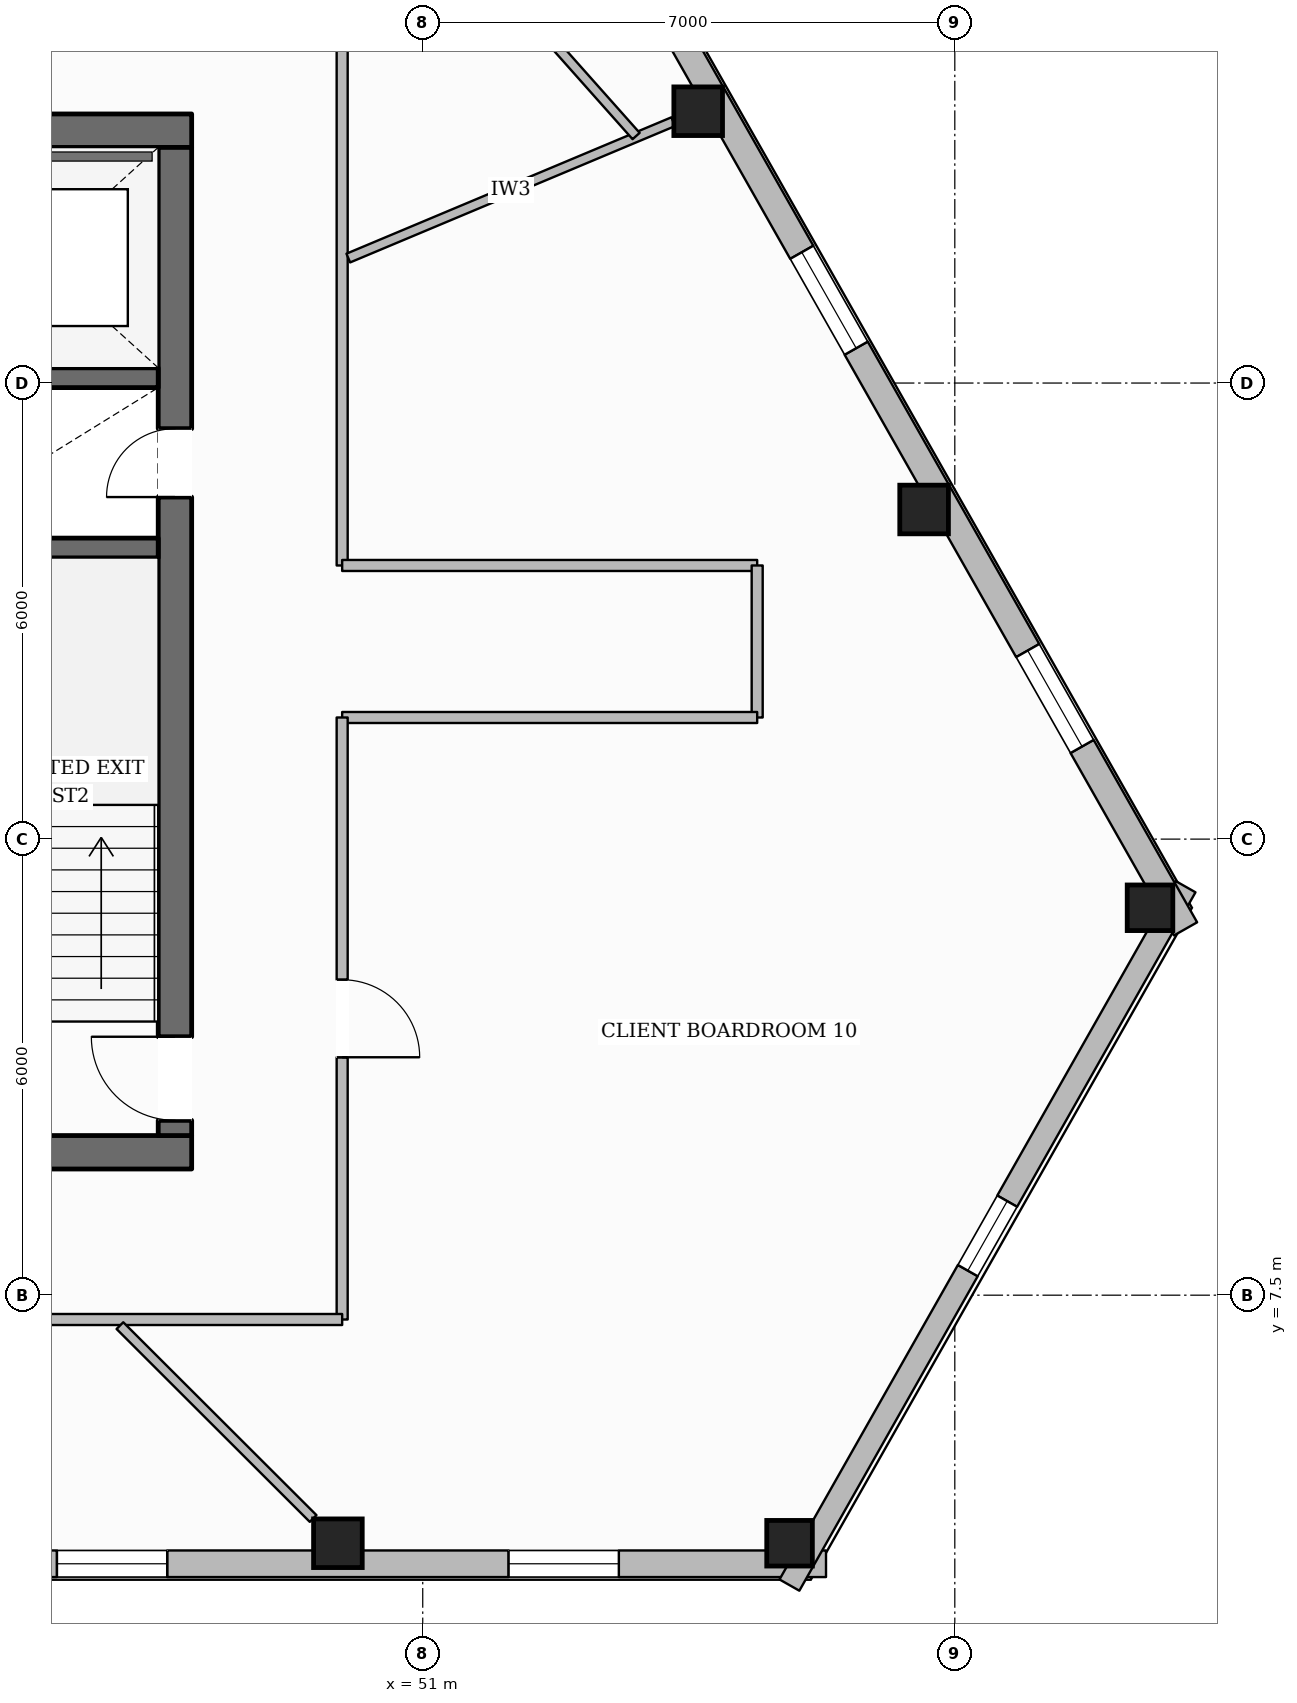
"""IFC4 building model, lengths in metres.
Left out: names, types, materials, properties, quantities, classifications, styles, units other than length and angle.
Written with IfcOpenShell. Run it as: python <this file> out.ifc"""

import sys

from ifc_helpers import new_model, si_unit, direction, frame, frame_2d, origin, origin_2d, place, context, subcontext, project, spatial, rectangle, hollow_rectangle, extrude, element, fill, save


model = new_model("IFC4")
c1 = context("Model", 3, precision=1e-05, world=origin(), true_north=direction((0.0, 1.0)))
c2 = subcontext(c1, "Body", "Model", "MODEL_VIEW")
j1 = project(units=[si_unit("LENGTHUNIT", "METRE"), si_unit("PLANEANGLEUNIT", "RADIAN")], contexts=[c1])
p1 = place(None, origin())
s1 = spatial("IfcSite", under=j1, at=p1, CompositionType="ELEMENT")
p2 = place(p1, origin())
s2 = spatial("IfcBuilding", under=s1, at=p2, CompositionType="ELEMENT")
p3 = place(p2, frame((0.0, 0.0, 165.0)))
s3 = spatial("IfcBuildingStorey", under=s2, at=p3, CompositionType="ELEMENT", Elevation=165.0)
p4 = place(p3, frame((28.04, 9.38, 0.0), z_axis=(0.0, 0.0, 1.0), x_axis=(1.0, 0.0, 0.0)))
e1 = element("IfcWall", 1, at=p4, inside=s3, PredefinedType="SOLIDWALL", context=c2, shape_type="SweptSolid", body=[
    extrude(rectangle(XDim=19.92, YDim=0.44, at=frame_2d((9.96, 0.0))), origin(), (0.0, 0.0, 1.0), 3.6),
])
p5 = place(p4, frame((10.46, 0.0, 0.0)))
e2 = element("IfcOpeningElement", 2, at=p5, cuts=e1, PredefinedType="OPENING", context=c2, shape_type="SweptSolid", body=[
    extrude(rectangle(XDim=1.4, YDim=2.2, at=frame_2d((0.7, 1.1))), frame((0.0, 0.23, 0.0), z_axis=(0.0, -1.0, 0.0), x_axis=(1.0, 0.0, 0.0)), (0.0, 0.0, 1.0), 0.46),
])
p6 = place(p3, frame((28.04, 22.82, 0.0), z_axis=(0.0, 0.0, 1.0), x_axis=(1.0, 0.0, 0.0)))
e3 = element("IfcWall", 3, at=p6, inside=s3, PredefinedType="SOLIDWALL", context=c2, shape_type="SweptSolid", body=[
    extrude(rectangle(XDim=19.92, YDim=0.44, at=frame_2d((9.96, 0.0))), origin(), (0.0, 0.0, 1.0), 3.6),
])
p7 = place(p6, frame((6.235, 0.0, 0.0)))
e4 = element("IfcOpeningElement", 4, at=p7, cuts=e3, PredefinedType="OPENING", context=c2, shape_type="SweptSolid", body=[
    extrude(rectangle(XDim=1.05, YDim=2.15, at=frame_2d((0.525, 1.075))), frame((0.0, 0.23, 0.0), z_axis=(0.0, -1.0, 0.0), x_axis=(1.0, 0.0, 0.0)), (0.0, 0.0, 1.0), 0.46),
])
p8 = place(p6, frame((12.635, 0.0, 0.0)))
e5 = element("IfcOpeningElement", 5, at=p8, cuts=e3, PredefinedType="OPENING", context=c2, shape_type="SweptSolid", body=[
    extrude(rectangle(XDim=1.05, YDim=2.15, at=frame_2d((0.525, 1.075))), frame((0.0, 0.23, 0.0), z_axis=(0.0, -1.0, 0.0), x_axis=(1.0, 0.0, 0.0)), (0.0, 0.0, 1.0), 0.46),
])
p9 = place(p3, frame((47.74, 9.6, 0.0), z_axis=(0.0, 0.0, 1.0), x_axis=(0.0, 1.0, 0.0)))
e6 = element("IfcWall", 6, at=p9, inside=s3, PredefinedType="SOLIDWALL", context=c2, shape_type="SweptSolid", body=[
    extrude(rectangle(XDim=13.0, YDim=0.44, at=frame_2d((6.5, 0.0))), origin(), (0.0, 0.0, 1.0), 3.6),
])
p10 = place(p9, frame((0.2, 0.0, 0.0)))
e7 = element("IfcOpeningElement", 7, at=p10, cuts=e6, PredefinedType="OPENING", context=c2, shape_type="SweptSolid", body=[
    extrude(rectangle(XDim=1.1, YDim=2.15, at=frame_2d((0.55, 1.075))), frame((0.0, 0.23, 0.0), z_axis=(0.0, -1.0, 0.0), x_axis=(1.0, 0.0, 0.0)), (0.0, 0.0, 1.0), 0.46),
])
p11 = place(p9, frame((8.4, 0.0, 0.0)))
e8 = element("IfcOpeningElement", 8, at=p11, cuts=e6, PredefinedType="OPENING", context=c2, shape_type="SweptSolid", body=[
    extrude(rectangle(XDim=0.9, YDim=2.1, at=frame_2d((0.45, 1.05))), frame((0.0, 0.23, 0.0), z_axis=(0.0, -1.0, 0.0), x_axis=(1.0, 0.0, 0.0)), (0.0, 0.0, 1.0), 0.46),
])
for number, where, z_axis, x_axis in (
    (9, (44.32, 17.33, 0.0), (0.0, 0.0, 1.0), (1.0, 0.0, 0.0)),
    (10, (44.32, 19.57, 0.0), (0.0, 0.0, 1.0), (1.0, 0.0, 0.0)),
):
    element("IfcWall", number, at=place(p3, frame(where, z_axis=z_axis, x_axis=x_axis)), inside=s3, PredefinedType="SHEAR", context=c2, shape_type="SweptSolid", body=[
        extrude(rectangle(XDim=3.2, YDim=0.26, at=frame_2d((1.6, 0.0))), origin(), (0.0, 0.0, 1.0), 3.6),
    ])
p12 = place(p3, frame((49.884, 4.237, 0.0), z_axis=(0.0, 0.0, 1.0), x_axis=(1.0, 0.0, 0.0)))
e11 = element("IfcColumn", 11, at=p12, inside=s3, PredefinedType="COLUMN", context=c2, shape_type="SweptSolid", body=[
    extrude(hollow_rectangle(XDim=0.64, YDim=0.64, WallThickness=0.028, at=origin_2d()), origin(), (0.0, 0.0, 1.0), 3.6),
])
for number, where, z_axis, x_axis in (
    (12, (55.826, 4.237, 0.0), (0.0, 0.0, 1.0), (1.0, 0.0, 0.0)),
    (13, (60.568, 12.597, 0.0), (0.0, 0.0, 1.0), (1.0, 0.0, 0.0)),
):
    element("IfcColumn", number, at=place(p3, frame(where, z_axis=z_axis, x_axis=x_axis)), inside=s3, PredefinedType="COLUMN", context=c2, shape_type="SweptSolid", body=[
        extrude(hollow_rectangle(XDim=0.6, YDim=0.6, WallThickness=0.028, at=origin_2d()), origin(), (0.0, 0.0, 1.0), 3.6),
    ])
for number, where, z_axis, x_axis in (
    (14, (57.596, 17.836, 0.0), (0.0, 0.0, 1.0), (1.0, 0.0, 0.0)),
    (15, (54.624, 23.076, 0.0), (0.0, 0.0, 1.0), (1.0, 0.0, 0.0)),
):
    element("IfcColumn", number, at=place(p3, frame(where, z_axis=z_axis, x_axis=x_axis)), inside=s3, PredefinedType="COLUMN", context=c2, shape_type="SweptSolid", body=[
        extrude(hollow_rectangle(XDim=0.64, YDim=0.64, WallThickness=0.028, at=origin_2d()), origin(), (0.0, 0.0, 1.0), 3.6),
    ])
p13 = place(p3, frame((56.305, 3.967, 0.0), z_axis=(0.0, 0.0, 1.0), x_axis=(-1.0, 0.0, 0.0)))
e16 = element("IfcWall", 16, at=p13, inside=s3, PredefinedType="STANDARD", context=c2, shape_type="SweptSolid", body=[
    extrude(rectangle(XDim=36.611, YDim=0.35, at=frame_2d((18.305, 0.0))), origin(), (0.0, 0.0, 1.0), 3.132),
])
p14 = place(p13, frame((32.435, 0.0, 0.65)))
e17 = element("IfcOpeningElement", 17, at=p14, cuts=e16, PredefinedType="OPENING", context=c2, shape_type="SweptSolid", body=[
    extrude(rectangle(XDim=1.45, YDim=1.75, at=frame_2d((0.725, 0.875))), frame((0.0, 0.185, 0.0), z_axis=(0.0, -1.0, 0.0), x_axis=(1.0, 0.0, 0.0)), (0.0, 0.0, 1.0), 0.37),
])
p15 = place(p13, frame((26.493, 0.0, 0.65)))
e18 = element("IfcOpeningElement", 18, at=p15, cuts=e16, PredefinedType="OPENING", context=c2, shape_type="SweptSolid", body=[
    extrude(rectangle(XDim=1.45, YDim=1.75, at=frame_2d((0.725, 0.875))), frame((0.0, 0.185, 0.0), z_axis=(0.0, -1.0, 0.0), x_axis=(1.0, 0.0, 0.0)), (0.0, 0.0, 1.0), 0.37),
])
p16 = place(p13, frame((14.61, 0.0, 0.65)))
e19 = element("IfcOpeningElement", 19, at=p16, cuts=e16, PredefinedType="OPENING", context=c2, shape_type="SweptSolid", body=[
    extrude(rectangle(XDim=1.45, YDim=1.75, at=frame_2d((0.725, 0.875))), frame((0.0, 0.185, 0.0), z_axis=(0.0, -1.0, 0.0), x_axis=(1.0, 0.0, 0.0)), (0.0, 0.0, 1.0), 0.37),
])
p17 = place(p13, frame((8.667, 0.0, 0.65)))
e20 = element("IfcOpeningElement", 20, at=p17, cuts=e16, PredefinedType="OPENING", context=c2, shape_type="SweptSolid", body=[
    extrude(rectangle(XDim=1.45, YDim=1.75, at=frame_2d((0.725, 0.875))), frame((0.0, 0.185, 0.0), z_axis=(0.0, -1.0, 0.0), x_axis=(1.0, 0.0, 0.0)), (0.0, 0.0, 1.0), 0.37),
])
p18 = place(p13, frame((2.726, 0.0, 0.65)))
e21 = element("IfcOpeningElement", 21, at=p18, cuts=e16, PredefinedType="OPENING", context=c2, shape_type="SweptSolid", body=[
    extrude(rectangle(XDim=1.45, YDim=1.75, at=frame_2d((0.725, 0.875))), frame((0.0, 0.185, 0.0), z_axis=(0.0, -1.0, 0.0), x_axis=(1.0, 0.0, 0.0)), (0.0, 0.0, 1.0), 0.37),
])
p19 = place(p3, frame((61.036, 12.874, 0.0), z_axis=(0.0, 0.0, 1.0), x_axis=(-0.493371164069, -0.869818886013, 0.0)))
e22 = element("IfcWall", 22, at=p19, inside=s3, PredefinedType="STANDARD", context=c2, shape_type="SweptSolid", body=[
    extrude(rectangle(XDim=10.563, YDim=0.3, at=frame_2d((5.282, 0.0))), origin(), (0.0, 0.0, 1.0), 3.132),
])
p20 = place(p19, frame((4.757, 0.0, 0.65)))
e23 = element("IfcOpeningElement", 23, at=p20, cuts=e22, PredefinedType="OPENING", context=c2, shape_type="SweptSolid", body=[
    extrude(rectangle(XDim=1.05, YDim=1.7, at=frame_2d((0.525, 0.85))), frame((0.0, 0.16, 0.0), z_axis=(0.0, -1.0, 0.0), x_axis=(1.0, 0.0, 0.0)), (0.0, 0.0, 1.0), 0.32),
])
p21 = place(p3, frame((42.733, 44.585, 0.0), z_axis=(0.0, 0.0, 1.0), x_axis=(0.493387150796, -0.869809817966, 0.0)))
e24 = element("IfcWall", 24, at=p21, inside=s3, PredefinedType="STANDARD", context=c2, shape_type="SweptSolid", body=[
    extrude(rectangle(XDim=37.096, YDim=0.35, at=frame_2d((18.548, 0.0))), origin(), (0.0, 0.0, 1.0), 3.132),
])
p22 = place(p21, frame((32.886, 0.0, 0.65)))
e25 = element("IfcOpeningElement", 25, at=p22, cuts=e24, PredefinedType="OPENING", context=c2, shape_type="SweptSolid", body=[
    extrude(rectangle(XDim=1.45, YDim=1.75, at=frame_2d((0.725, 0.875))), frame((0.0, 0.185, 0.0), z_axis=(0.0, -1.0, 0.0), x_axis=(1.0, 0.0, 0.0)), (0.0, 0.0, 1.0), 0.37),
])
p23 = place(p21, frame((26.863, 0.0, 0.65)))
e26 = element("IfcOpeningElement", 26, at=p23, cuts=e24, PredefinedType="OPENING", context=c2, shape_type="SweptSolid", body=[
    extrude(rectangle(XDim=1.45, YDim=1.75, at=frame_2d((0.725, 0.875))), frame((0.0, 0.185, 0.0), z_axis=(0.0, -1.0, 0.0), x_axis=(1.0, 0.0, 0.0)), (0.0, 0.0, 1.0), 0.37),
])
p24 = place(p21, frame((14.814, 0.0, 0.65)))
e27 = element("IfcOpeningElement", 27, at=p24, cuts=e24, PredefinedType="OPENING", context=c2, shape_type="SweptSolid", body=[
    extrude(rectangle(XDim=1.45, YDim=1.75, at=frame_2d((0.725, 0.875))), frame((0.0, 0.185, 0.0), z_axis=(0.0, -1.0, 0.0), x_axis=(1.0, 0.0, 0.0)), (0.0, 0.0, 1.0), 0.37),
])
p25 = place(p21, frame((8.791, 0.0, 0.65)))
e28 = element("IfcOpeningElement", 28, at=p25, cuts=e24, PredefinedType="OPENING", context=c2, shape_type="SweptSolid", body=[
    extrude(rectangle(XDim=1.45, YDim=1.75, at=frame_2d((0.725, 0.875))), frame((0.0, 0.185, 0.0), z_axis=(0.0, -1.0, 0.0), x_axis=(1.0, 0.0, 0.0)), (0.0, 0.0, 1.0), 0.37),
])
p26 = place(p21, frame((2.767, 0.0, 0.65)))
e29 = element("IfcOpeningElement", 29, at=p26, cuts=e24, PredefinedType="OPENING", context=c2, shape_type="SweptSolid", body=[
    extrude(rectangle(XDim=1.45, YDim=1.75, at=frame_2d((0.725, 0.875))), frame((0.0, 0.185, 0.0), z_axis=(0.0, -1.0, 0.0), x_axis=(1.0, 0.0, 0.0)), (0.0, 0.0, 1.0), 0.37),
])
p27 = place(p3, frame((49.94, 25.02, 0.0), z_axis=(0.0, 0.0, 1.0), x_axis=(0.0, -1.0, 0.0)))
e30 = element("IfcWall", 30, at=p27, inside=s3, PredefinedType="PARTITIONING", context=c2, shape_type="SweptSolid", body=[
    extrude(rectangle(XDim=7.92, YDim=0.145, at=frame_2d((3.96, 0.0))), origin(), (0.0, 0.0, 1.0), 3.339),
])
p28 = place(p3, frame((49.94, 17.1, 0.0), z_axis=(0.0, 0.0, 1.0), x_axis=(1.0, 0.0, 0.0)))
e31 = element("IfcWall", 31, at=p28, inside=s3, PredefinedType="PARTITIONING", context=c2, shape_type="SweptSolid", body=[
    extrude(rectangle(XDim=5.46, YDim=0.145, at=frame_2d((2.73, 0.0))), origin(), (0.0, 0.0, 1.0), 3.6),
])
p29 = place(p3, frame((55.4, 17.1, 0.0), z_axis=(0.0, 0.0, 1.0), x_axis=(0.0, -1.0, 0.0)))
e32 = element("IfcWall", 32, at=p29, inside=s3, PredefinedType="PARTITIONING", context=c2, shape_type="SweptSolid", body=[
    extrude(rectangle(XDim=2.0, YDim=0.145, at=frame_2d((1.0, 0.0))), origin(), (0.0, 0.0, 1.0), 3.339),
])
p30 = place(p3, frame((55.4, 15.1, 0.0), z_axis=(0.0, 0.0, 1.0), x_axis=(-1.0, 0.0, 0.0)))
e33 = element("IfcWall", 33, at=p30, inside=s3, PredefinedType="PARTITIONING", context=c2, shape_type="SweptSolid", body=[
    extrude(rectangle(XDim=5.46, YDim=0.145, at=frame_2d((2.73, 0.0))), origin(), (0.0, 0.0, 1.0), 3.6),
])
p31 = place(p3, frame((49.94, 15.1, 0.0), z_axis=(0.0, 0.0, 1.0), x_axis=(0.0, -1.0, 0.0)))
e34 = element("IfcWall", 34, at=p31, inside=s3, PredefinedType="PARTITIONING", context=c2, shape_type="SweptSolid", body=[
    extrude(rectangle(XDim=7.92, YDim=0.145, at=frame_2d((3.96, 0.0))), origin(), (0.0, 0.0, 1.0), 3.6),
])
p32 = place(p31, frame((3.45, 0.0, 0.0)))
e35 = element("IfcOpeningElement", 35, at=p32, cuts=e34, PredefinedType="OPENING", context=c2, shape_type="SweptSolid", body=[
    extrude(rectangle(XDim=1.02, YDim=2.15, at=frame_2d((0.51, 1.075))), frame((0.0, 0.083, 0.0), z_axis=(0.0, -1.0, 0.0), x_axis=(1.0, 0.0, 0.0)), (0.0, 0.0, 1.0), 0.165),
])
p33 = place(p3, frame((49.94, 7.18, 0.0), z_axis=(0.0, 0.0, 1.0), x_axis=(-1.0, 0.0, 0.0)))
e36 = element("IfcWall", 36, at=p33, inside=s3, PredefinedType="PARTITIONING", context=c2, shape_type="SweptSolid", body=[
    extrude(rectangle(XDim=23.88, YDim=0.145, at=frame_2d((11.94, 0.0))), origin(), (0.0, 0.0, 1.0), 3.6),
])
p34 = place(p33, frame((19.789, 0.0, 0.0)))
e37 = element("IfcOpeningElement", 37, at=p34, cuts=e36, PredefinedType="OPENING", context=c2, shape_type="SweptSolid", body=[
    extrude(rectangle(XDim=0.98, YDim=2.15, at=frame_2d((0.49, 1.075))), frame((0.0, 0.083, 0.0), z_axis=(0.0, -1.0, 0.0), x_axis=(1.0, 0.0, 0.0)), (0.0, 0.0, 1.0), 0.165),
])
p35 = place(p33, frame((9.236, 0.0, 0.0)))
e38 = element("IfcOpeningElement", 38, at=p35, cuts=e36, PredefinedType="OPENING", context=c2, shape_type="SweptSolid", body=[
    extrude(rectangle(XDim=0.98, YDim=2.15, at=frame_2d((0.49, 1.075))), frame((0.0, 0.083, 0.0), z_axis=(0.0, -1.0, 0.0), x_axis=(1.0, 0.0, 0.0)), (0.0, 0.0, 1.0), 0.165),
])
p36 = place(p3, frame((50.021, 21.144, 0.0), z_axis=(0.0, 0.0, 1.0), x_axis=(0.922095611861, 0.38696212035, 0.0)))
e39 = element("IfcWall", 39, at=p36, inside=s3, PredefinedType="PARTITIONING", context=c2, shape_type="SweptSolid", body=[
    extrude(rectangle(XDim=4.637, YDim=0.125, at=frame_2d((2.318, 0.0))), origin(), (0.0, 0.0, 1.0), 3.6),
])
p37 = place(p3, frame((47.016, 7.1, 0.0), z_axis=(0.0, 0.0, 1.0), x_axis=(0.707718259203, -0.70649477393, 0.0)))
e40 = element("IfcWall", 40, at=p37, inside=s3, PredefinedType="PARTITIONING", context=c2, shape_type="SweptSolid", body=[
    extrude(rectangle(XDim=3.592, YDim=0.125, at=frame_2d((1.796, 0.0))), origin(), (0.0, 0.0, 1.0), 3.6),
])
p38 = place(p3, frame((53.807, 22.75, 0.0), z_axis=(0.0, 0.0, 1.0), x_axis=(-0.664519515039, 0.747270910803, 0.0)))
e41 = element("IfcWall", 41, at=p38, inside=s3, PredefinedType="PARTITIONING", context=c2, shape_type="SweptSolid", body=[
    extrude(rectangle(XDim=10.123, YDim=0.125, at=frame_2d((5.061, 0.0))), origin(), (0.0, 0.0, 1.0), 3.339),
])
p39 = place(p38, frame((4.547, 0.0, 0.0)))
e42 = element("IfcOpeningElement", 42, at=p39, cuts=e41, PredefinedType="OPENING", context=c2, shape_type="SweptSolid", body=[
    extrude(rectangle(XDim=1.02, YDim=2.15, at=frame_2d((0.51, 1.075))), frame((0.0, 0.073, 0.0), z_axis=(0.0, -1.0, 0.0), x_axis=(1.0, 0.0, 0.0)), (0.0, 0.0, 1.0), 0.145),
])
p40 = place(p17, origin())
e43 = element("IfcWindow", 43, at=p40, inside=s3, PartitioningType="SINGLE_PANEL", PredefinedType="WINDOW", context=c2, shape_type="SweptSolid", body=[
    extrude(rectangle(XDim=1.45, YDim=1.75, at=frame_2d((0.725, 0.875))), frame((0.0, 0.03, 0.0), z_axis=(0.0, -1.0, 0.0), x_axis=(1.0, 0.0, 0.0)), (0.0, 0.0, 1.0), 0.06),
])
fill(e20, e43)
p41 = place(p18, origin())
e44 = element("IfcWindow", 44, at=p41, inside=s3, PartitioningType="SINGLE_PANEL", PredefinedType="WINDOW", context=c2, shape_type="SweptSolid", body=[
    extrude(rectangle(XDim=1.45, YDim=1.75, at=frame_2d((0.725, 0.875))), frame((0.0, 0.03, 0.0), z_axis=(0.0, -1.0, 0.0), x_axis=(1.0, 0.0, 0.0)), (0.0, 0.0, 1.0), 0.06),
])
fill(e21, e44)
p42 = place(p22, origin())
e45 = element("IfcWindow", 45, at=p42, inside=s3, PartitioningType="SINGLE_PANEL", PredefinedType="WINDOW", context=c2, shape_type="SweptSolid", body=[
    extrude(rectangle(XDim=1.45, YDim=1.75, at=frame_2d((0.725, 0.875))), frame((0.0, 0.03, 0.0), z_axis=(0.0, -1.0, 0.0), x_axis=(1.0, 0.0, 0.0)), (0.0, 0.0, 1.0), 0.06),
])
fill(e25, e45)
p43 = place(p23, origin())
e46 = element("IfcWindow", 46, at=p43, inside=s3, PartitioningType="SINGLE_PANEL", PredefinedType="WINDOW", context=c2, shape_type="SweptSolid", body=[
    extrude(rectangle(XDim=1.45, YDim=1.75, at=frame_2d((0.725, 0.875))), frame((0.0, 0.03, 0.0), z_axis=(0.0, -1.0, 0.0), x_axis=(1.0, 0.0, 0.0)), (0.0, 0.0, 1.0), 0.06),
])
fill(e26, e46)
p44 = place(p20, origin())
e47 = element("IfcWindow", 47, at=p44, inside=s3, PartitioningType="SINGLE_PANEL", PredefinedType="WINDOW", context=c2, shape_type="SweptSolid", body=[
    extrude(rectangle(XDim=1.05, YDim=1.7, at=frame_2d((0.525, 0.85))), frame((0.0, 0.03, 0.0), z_axis=(0.0, -1.0, 0.0), x_axis=(1.0, 0.0, 0.0)), (0.0, 0.0, 1.0), 0.06),
])
fill(e23, e47)
p45 = place(p10, origin())
e48 = element("IfcDoor", 48, at=p45, inside=s3, OperationType="SINGLE_SWING_RIGHT", PredefinedType="DOOR", context=c2, shape_type="SweptSolid", body=[
    extrude(rectangle(XDim=1.1, YDim=2.15, at=frame_2d((0.55, 1.075))), frame((0.0, 0.025, 0.0), z_axis=(0.0, -1.0, 0.0), x_axis=(1.0, 0.0, 0.0)), (0.0, 0.0, 1.0), 0.05),
])
fill(e7, e48)
p46 = place(p11, origin())
e49 = element("IfcDoor", 49, at=p46, inside=s3, OperationType="SINGLE_SWING_LEFT", PredefinedType="DOOR", context=c2, shape_type="SweptSolid", body=[
    extrude(rectangle(XDim=0.9, YDim=2.1, at=frame_2d((0.45, 1.05))), frame((0.0, 0.025, 0.0), z_axis=(0.0, -1.0, 0.0), x_axis=(1.0, 0.0, 0.0)), (0.0, 0.0, 1.0), 0.05),
])
fill(e8, e49)
p47 = place(p32, origin())
e50 = element("IfcDoor", 50, at=p47, inside=s3, OperationType="SINGLE_SWING_RIGHT", PredefinedType="DOOR", context=c2, shape_type="SweptSolid", body=[
    extrude(rectangle(XDim=1.02, YDim=2.15, at=frame_2d((0.51, 1.075))), frame((0.0, 0.025, 0.0), z_axis=(0.0, -1.0, 0.0), x_axis=(1.0, 0.0, 0.0)), (0.0, 0.0, 1.0), 0.05),
])
fill(e35, e50)
save(model, sys.argv[1])
